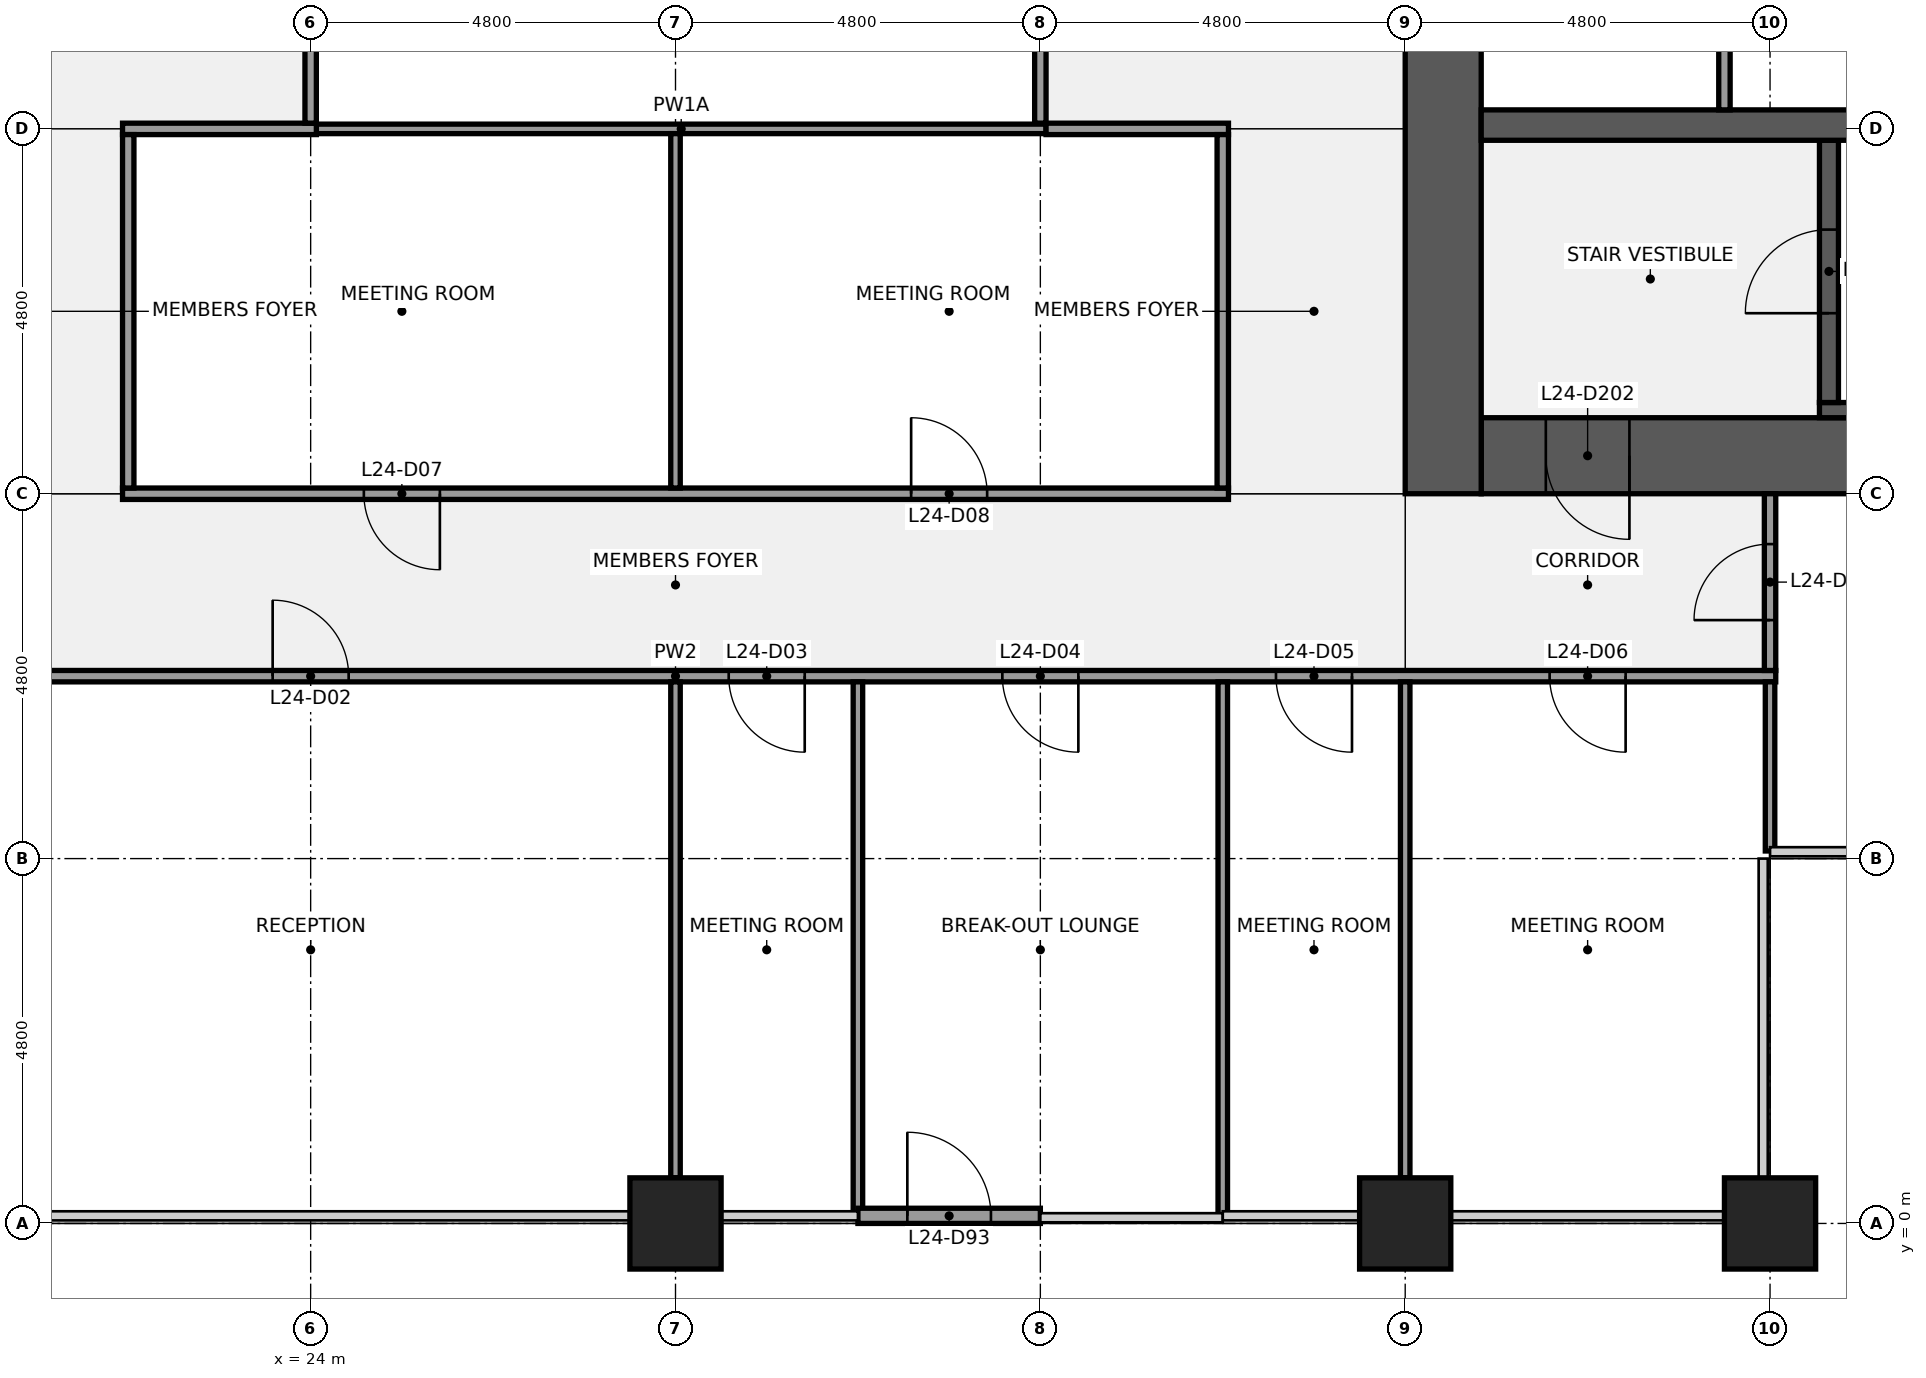
"""IFC4 building model, lengths in metres.
Left out: names, types, materials, properties, quantities, classifications, styles, units other than length and angle.
Written with IfcOpenShell. Run it as: python <this file> out.ifc"""

import sys

from ifc_helpers import new_model, si_unit, direction, frame, frame_2d, origin, origin_2d, place, context, subcontext, project, spatial, rectangle, extrude, element, fill, save


model = new_model("IFC4")
c1 = context("Model", 3, precision=1e-05, world=origin(), true_north=direction((0.0, 1.0)))
c2 = subcontext(c1, "Body", "Model", "MODEL_VIEW")
j1 = project(units=[si_unit("LENGTHUNIT", "METRE"), si_unit("PLANEANGLEUNIT", "RADIAN")], contexts=[c1])
p1 = place(None, origin())
s1 = spatial("IfcSite", under=j1, at=p1, CompositionType="ELEMENT")
p2 = place(p1, origin())
s2 = spatial("IfcBuilding", under=s1, at=p2, CompositionType="ELEMENT")
p3 = place(p2, frame((0.0, 0.0, 116.1)))
s3 = spatial("IfcBuildingStorey", under=s2, at=p3, CompositionType="ELEMENT", Elevation=116.1)
for number, where, z_axis, x_axis in (
    (1, (28.8, 0.0, 0.0), (0.0, 0.0, 1.0), (1.0, 0.0, 0.0)),
    (2, (38.4, 0.0, 0.0), (0.0, 0.0, 1.0), (1.0, 0.0, 0.0)),
    (3, (43.2, 0.0, 0.0), (0.0, 0.0, 1.0), (1.0, 0.0, 0.0)),
):
    element("IfcColumn", number, at=place(p3, frame(where, z_axis=z_axis, x_axis=x_axis)), inside=s3, PredefinedType="COLUMN", context=c2, shape_type="SweptSolid", body=[
        extrude(rectangle(XDim=1.2, YDim=1.2, at=origin_2d()), origin(), (0.0, 0.0, 1.0), 4.0),
    ])
p4 = place(p3, frame((52.8, 10.1, 0.0), z_axis=(0.0, 0.0, 1.0), x_axis=(-1.0, 0.0, 0.0)))
e4 = element("IfcWall", 4, at=p4, inside=s3, PredefinedType="SHEAR", context=c2, shape_type="SweptSolid", body=[
    extrude(rectangle(XDim=13.4, YDim=1.0, at=frame_2d((6.7, 0.0))), origin(), (0.0, 0.0, 1.0), 3.84),
])
p5 = place(p4, frame((11.45, 0.0, 0.0)))
e5 = element("IfcOpeningElement", 5, at=p5, cuts=e4, PredefinedType="OPENING", context=c2, shape_type="SweptSolid", body=[
    extrude(rectangle(XDim=1.1, YDim=2.1, at=frame_2d((0.55, 1.05))), frame((0.0, 0.51, 0.0), z_axis=(0.0, -1.0, 0.0), x_axis=(1.0, 0.0, 0.0)), (0.0, 0.0, 1.0), 1.02),
])
p6 = place(p3, frame((38.9, 9.6, 0.0), z_axis=(0.0, 0.0, 1.0), x_axis=(0.0, 1.0, 0.0)))
e6 = element("IfcWall", 6, at=p6, inside=s3, PredefinedType="SHEAR", context=c2, shape_type="SweptSolid", body=[
    extrude(rectangle(XDim=28.8, YDim=1.0, at=frame_2d((14.4, 0.0))), origin(), (0.0, 0.0, 1.0), 3.84),
])
p7 = place(p6, frame((8.7, 0.0, 0.0)))
e7 = element("IfcOpeningElement", 7, at=p7, cuts=e6, PredefinedType="OPENING", context=c2, shape_type="SweptSolid", body=[
    extrude(rectangle(XDim=1.8, YDim=2.1, at=frame_2d((0.9, 1.05))), frame((0.0, 0.51, 0.0), z_axis=(0.0, -1.0, 0.0), x_axis=(1.0, 0.0, 0.0)), (0.0, 0.0, 1.0), 1.02),
])
p8 = place(p6, frame((18.3, 0.0, 0.0)))
e8 = element("IfcOpeningElement", 8, at=p8, cuts=e6, PredefinedType="OPENING", context=c2, shape_type="SweptSolid", body=[
    extrude(rectangle(XDim=1.8, YDim=2.1, at=frame_2d((0.9, 1.05))), frame((0.0, 0.51, 0.0), z_axis=(0.0, -1.0, 0.0), x_axis=(1.0, 0.0, 0.0)), (0.0, 0.0, 1.0), 1.02),
])
p9 = place(p3, frame((43.85, 10.7, 0.0), z_axis=(0.0, 0.0, 1.0), x_axis=(1.0, 0.0, 0.0)))
e9 = element("IfcWall", 9, at=p9, inside=s3, PredefinedType="SHEAR", context=c2, shape_type="SweptSolid", body=[
    extrude(rectangle(XDim=7.5, YDim=0.2, at=frame_2d((3.75, 0.0))), origin(), (0.0, 0.0, 1.0), 3.84),
])
p10 = place(p3, frame((43.975, 10.8, 0.0), z_axis=(0.0, 0.0, 1.0), x_axis=(0.0, 1.0, 0.0)))
e10 = element("IfcWall", 10, at=p10, inside=s3, PredefinedType="SHEAR", context=c2, shape_type="SweptSolid", body=[
    extrude(rectangle(XDim=3.45, YDim=0.25, at=frame_2d((1.725, 0.0))), origin(), (0.0, 0.0, 1.0), 3.84),
])
p11 = place(p10, frame((1.175, 0.0, 0.0)))
e11 = element("IfcOpeningElement", 11, at=p11, cuts=e10, PredefinedType="OPENING", context=c2, shape_type="SweptSolid", body=[
    extrude(rectangle(XDim=1.1, YDim=2.1, at=frame_2d((0.55, 1.05))), frame((0.0, 0.135, 0.0), z_axis=(0.0, -1.0, 0.0), x_axis=(1.0, 0.0, 0.0)), (0.0, 0.0, 1.0), 0.27),
])
p12 = place(p3, frame((39.4, 14.45, 0.0), z_axis=(0.0, 0.0, 1.0), x_axis=(1.0, 0.0, 0.0)))
e12 = element("IfcWall", 12, at=p12, inside=s3, PredefinedType="SHEAR", context=c2, shape_type="SweptSolid", body=[
    extrude(rectangle(XDim=17.2, YDim=0.4, at=frame_2d((8.6, 0.0))), origin(), (0.0, 0.0, 1.0), 3.84),
])
p13 = place(p3, frame((42.6, 14.65, 0.0), z_axis=(0.0, 0.0, 1.0), x_axis=(0.0, 1.0, 0.0)))
e13 = element("IfcWall", 13, at=p13, inside=s3, PredefinedType="PARTITIONING", context=c2, shape_type="SweptSolid", body=[
    extrude(rectangle(XDim=2.6, YDim=0.15, at=frame_2d((1.3, 0.0))), origin(), (0.0, 0.0, 1.0), 3.84),
])
p14 = place(p3, frame((14.325, 7.2, 0.0), z_axis=(0.0, 0.0, 1.0), x_axis=(1.0, 0.0, 0.0)))
e14 = element("IfcWall", 14, at=p14, inside=s3, PredefinedType="PARTITIONING", context=c2, shape_type="SweptSolid", body=[
    extrude(rectangle(XDim=28.95, YDim=0.15, at=frame_2d((14.475, 0.0))), origin(), (0.0, 0.0, 1.0), 2.936),
])
p15 = place(p14, frame((1.975, 0.0, 0.0)))
e15 = element("IfcOpeningElement", 15, at=p15, cuts=e14, PredefinedType="OPENING", context=c2, shape_type="SweptSolid", body=[
    extrude(rectangle(XDim=1.0, YDim=2.1, at=frame_2d((0.5, 1.05))), frame((0.0, 0.085, 0.0), z_axis=(0.0, -1.0, 0.0), x_axis=(1.0, 0.0, 0.0)), (0.0, 0.0, 1.0), 0.17),
])
p16 = place(p14, frame((9.175, 0.0, 0.0)))
e16 = element("IfcOpeningElement", 16, at=p16, cuts=e14, PredefinedType="OPENING", context=c2, shape_type="SweptSolid", body=[
    extrude(rectangle(XDim=1.0, YDim=2.1, at=frame_2d((0.5, 1.05))), frame((0.0, 0.085, 0.0), z_axis=(0.0, -1.0, 0.0), x_axis=(1.0, 0.0, 0.0)), (0.0, 0.0, 1.0), 0.17),
])
p17 = place(p14, frame((15.175, 0.0, 0.0)))
e17 = element("IfcOpeningElement", 17, at=p17, cuts=e14, PredefinedType="OPENING", context=c2, shape_type="SweptSolid", body=[
    extrude(rectangle(XDim=1.0, YDim=2.1, at=frame_2d((0.5, 1.05))), frame((0.0, 0.085, 0.0), z_axis=(0.0, -1.0, 0.0), x_axis=(1.0, 0.0, 0.0)), (0.0, 0.0, 1.0), 0.17),
])
p18 = place(p14, frame((18.775, 0.0, 0.0)))
e18 = element("IfcOpeningElement", 18, at=p18, cuts=e14, PredefinedType="OPENING", context=c2, shape_type="SweptSolid", body=[
    extrude(rectangle(XDim=1.0, YDim=2.1, at=frame_2d((0.5, 1.05))), frame((0.0, 0.085, 0.0), z_axis=(0.0, -1.0, 0.0), x_axis=(1.0, 0.0, 0.0)), (0.0, 0.0, 1.0), 0.17),
])
p19 = place(p14, frame((22.375, 0.0, 0.0)))
e19 = element("IfcOpeningElement", 19, at=p19, cuts=e14, PredefinedType="OPENING", context=c2, shape_type="SweptSolid", body=[
    extrude(rectangle(XDim=1.0, YDim=2.1, at=frame_2d((0.5, 1.05))), frame((0.0, 0.085, 0.0), z_axis=(0.0, -1.0, 0.0), x_axis=(1.0, 0.0, 0.0)), (0.0, 0.0, 1.0), 0.17),
])
p20 = place(p14, frame((25.975, 0.0, 0.0)))
e20 = element("IfcOpeningElement", 20, at=p20, cuts=e14, PredefinedType="OPENING", context=c2, shape_type="SweptSolid", body=[
    extrude(rectangle(XDim=1.0, YDim=2.1, at=frame_2d((0.5, 1.05))), frame((0.0, 0.085, 0.0), z_axis=(0.0, -1.0, 0.0), x_axis=(1.0, 0.0, 0.0)), (0.0, 0.0, 1.0), 0.17),
])
p21 = place(p3, frame((21.525, 9.6, 0.0), z_axis=(0.0, 0.0, 1.0), x_axis=(1.0, 0.0, 0.0)))
e21 = element("IfcWall", 21, at=p21, inside=s3, PredefinedType="PARTITIONING", context=c2, shape_type="SweptSolid", body=[
    extrude(rectangle(XDim=14.55, YDim=0.15, at=frame_2d((7.275, 0.0))), origin(), (0.0, 0.0, 1.0), 2.936),
])
p22 = place(p21, frame((3.175, 0.0, 0.0)))
e22 = element("IfcOpeningElement", 22, at=p22, cuts=e21, PredefinedType="OPENING", context=c2, shape_type="SweptSolid", body=[
    extrude(rectangle(XDim=1.0, YDim=2.1, at=frame_2d((0.5, 1.05))), frame((0.0, 0.085, 0.0), z_axis=(0.0, -1.0, 0.0), x_axis=(1.0, 0.0, 0.0)), (0.0, 0.0, 1.0), 0.17),
])
p23 = place(p21, frame((10.375, 0.0, 0.0)))
e23 = element("IfcOpeningElement", 23, at=p23, cuts=e21, PredefinedType="OPENING", context=c2, shape_type="SweptSolid", body=[
    extrude(rectangle(XDim=1.0, YDim=2.1, at=frame_2d((0.5, 1.05))), frame((0.0, 0.085, 0.0), z_axis=(0.0, -1.0, 0.0), x_axis=(1.0, 0.0, 0.0)), (0.0, 0.0, 1.0), 0.17),
])
p24 = place(p3, frame((24.075, 14.4, 0.0), z_axis=(0.0, 0.0, 1.0), x_axis=(1.0, 0.0, 0.0)))
e24 = element("IfcWall", 24, at=p24, inside=s3, PredefinedType="PARTITIONING", context=c2, shape_type="SweptSolid", body=[
    extrude(rectangle(XDim=9.6, YDim=0.125, at=frame_2d((4.8, 0.0))), origin(), (0.0, 0.0, 1.0), 2.936),
])
p25 = place(p3, frame((21.525, 14.4, 0.0), z_axis=(0.0, 0.0, 1.0), x_axis=(1.0, 0.0, 0.0)))
e25 = element("IfcWall", 25, at=p25, inside=s3, PredefinedType="PARTITIONING", context=c2, shape_type="SweptSolid", body=[
    extrude(rectangle(XDim=2.55, YDim=0.15, at=frame_2d((1.275, 0.0))), origin(), (0.0, 0.0, 1.0), 2.936),
])
p26 = place(p3, frame((33.675, 14.4, 0.0), z_axis=(0.0, 0.0, 1.0), x_axis=(1.0, 0.0, 0.0)))
e26 = element("IfcWall", 26, at=p26, inside=s3, PredefinedType="PARTITIONING", context=c2, shape_type="SweptSolid", body=[
    extrude(rectangle(XDim=2.4, YDim=0.15, at=frame_2d((1.2, 0.0))), origin(), (0.0, 0.0, 1.0), 2.936),
])
p27 = place(p3, frame((21.6, 9.675, 0.0), z_axis=(0.0, 0.0, 1.0), x_axis=(0.0, 1.0, 0.0)))
e27 = element("IfcWall", 27, at=p27, inside=s3, PredefinedType="PARTITIONING", context=c2, shape_type="SweptSolid", body=[
    extrude(rectangle(XDim=4.65, YDim=0.15, at=frame_2d((2.325, 0.0))), origin(), (0.0, 0.0, 1.0), 2.936),
])
p28 = place(p3, frame((24.0, 14.475, 0.0), z_axis=(0.0, 0.0, 1.0), x_axis=(0.0, 1.0, 0.0)))
e28 = element("IfcWall", 28, at=p28, inside=s3, PredefinedType="PARTITIONING", context=c2, shape_type="SweptSolid", body=[
    extrude(rectangle(XDim=3.45, YDim=0.15, at=frame_2d((1.725, 0.0))), origin(), (0.0, 0.0, 1.0), 2.936),
])
p29 = place(p3, frame((28.8, 0.6, 0.0), z_axis=(0.0, 0.0, 1.0), x_axis=(0.0, 1.0, 0.0)))
e29 = element("IfcWall", 29, at=p29, inside=s3, PredefinedType="PARTITIONING", context=c2, shape_type="SweptSolid", body=[
    extrude(rectangle(XDim=6.525, YDim=0.125, at=frame_2d((3.262, 0.0))), origin(), (0.0, 0.0, 1.0), 2.936),
])
p30 = place(p3, frame((28.8, 9.675, 0.0), z_axis=(0.0, 0.0, 1.0), x_axis=(0.0, 1.0, 0.0)))
e30 = element("IfcWall", 30, at=p30, inside=s3, PredefinedType="PARTITIONING", context=c2, shape_type="SweptSolid", body=[
    extrude(rectangle(XDim=4.662, YDim=0.125, at=frame_2d((2.331, 0.0))), origin(), (0.0, 0.0, 1.0), 2.936),
])
p31 = place(p3, frame((31.2, 0.1, 0.0), z_axis=(0.0, 0.0, 1.0), x_axis=(0.0, 1.0, 0.0)))
e31 = element("IfcWall", 31, at=p31, inside=s3, PredefinedType="PARTITIONING", context=c2, shape_type="SweptSolid", body=[
    extrude(rectangle(XDim=7.025, YDim=0.125, at=frame_2d((3.512, 0.0))), origin(), (0.0, 0.0, 1.0), 2.936),
])
p32 = place(p3, frame((33.6, 14.475, 0.0), z_axis=(0.0, 0.0, 1.0), x_axis=(0.0, 1.0, 0.0)))
e32 = element("IfcWall", 32, at=p32, inside=s3, PredefinedType="PARTITIONING", context=c2, shape_type="SweptSolid", body=[
    extrude(rectangle(XDim=3.45, YDim=0.15, at=frame_2d((1.725, 0.0))), origin(), (0.0, 0.0, 1.0), 2.936),
])
p33 = place(p3, frame((36.0, 0.1, 0.0), z_axis=(0.0, 0.0, 1.0), x_axis=(0.0, 1.0, 0.0)))
e33 = element("IfcWall", 33, at=p33, inside=s3, PredefinedType="PARTITIONING", context=c2, shape_type="SweptSolid", body=[
    extrude(rectangle(XDim=7.025, YDim=0.125, at=frame_2d((3.512, 0.0))), origin(), (0.0, 0.0, 1.0), 2.936),
])
p34 = place(p3, frame((36.0, 9.675, 0.0), z_axis=(0.0, 0.0, 1.0), x_axis=(0.0, 1.0, 0.0)))
e34 = element("IfcWall", 34, at=p34, inside=s3, PredefinedType="PARTITIONING", context=c2, shape_type="SweptSolid", body=[
    extrude(rectangle(XDim=4.65, YDim=0.15, at=frame_2d((2.325, 0.0))), origin(), (0.0, 0.0, 1.0), 2.936),
])
p35 = place(p3, frame((38.4, 0.6, 0.0), z_axis=(0.0, 0.0, 1.0), x_axis=(0.0, 1.0, 0.0)))
e35 = element("IfcWall", 35, at=p35, inside=s3, PredefinedType="PARTITIONING", context=c2, shape_type="SweptSolid", body=[
    extrude(rectangle(XDim=6.525, YDim=0.125, at=frame_2d((3.262, 0.0))), origin(), (0.0, 0.0, 1.0), 2.936),
])
p36 = place(p3, frame((43.2, 4.9, 0.0), z_axis=(0.0, 0.0, 1.0), x_axis=(0.0, 1.0, 0.0)))
e36 = element("IfcWall", 36, at=p36, inside=s3, PredefinedType="PARTITIONING", context=c2, shape_type="SweptSolid", body=[
    extrude(rectangle(XDim=2.225, YDim=0.125, at=frame_2d((1.113, 0.0))), origin(), (0.0, 0.0, 1.0), 2.936),
])
p37 = place(p3, frame((43.2, 7.275, 0.0), z_axis=(0.0, 0.0, 1.0), x_axis=(0.0, 1.0, 0.0)))
e37 = element("IfcWall", 37, at=p37, inside=s3, PredefinedType="PARTITIONING", context=c2, shape_type="SweptSolid", body=[
    extrude(rectangle(XDim=2.325, YDim=0.15, at=frame_2d((1.163, 0.0))), origin(), (0.0, 0.0, 1.0), 2.936),
])
p38 = place(p37, frame((0.663, 0.0, 0.0)))
e38 = element("IfcOpeningElement", 38, at=p38, cuts=e37, PredefinedType="OPENING", context=c2, shape_type="SweptSolid", body=[
    extrude(rectangle(XDim=1.0, YDim=2.1, at=frame_2d((0.5, 1.05))), frame((0.0, 0.085, 0.0), z_axis=(0.0, -1.0, 0.0), x_axis=(1.0, 0.0, 0.0)), (0.0, 0.0, 1.0), 0.17),
])
p39 = place(p3, frame((31.2, 0.1, 0.0), z_axis=(0.0, 0.0, 1.0), x_axis=(1.0, 0.0, 0.0)))
e39 = element("IfcWall", 39, at=p39, inside=s3, PredefinedType="SOLIDWALL", context=c2, shape_type="SweptSolid", body=[
    extrude(rectangle(XDim=2.4, YDim=0.2, at=frame_2d((1.2, 0.0))), origin(), (0.0, 0.0, 1.0), 3.314),
])
p40 = place(p39, frame((0.65, 0.0, 0.0)))
e40 = element("IfcOpeningElement", 40, at=p40, cuts=e39, PredefinedType="OPENING", context=c2, shape_type="SweptSolid", body=[
    extrude(rectangle(XDim=1.1, YDim=2.1, at=frame_2d((0.55, 1.05))), frame((0.0, 0.11, 0.0), z_axis=(0.0, -1.0, 0.0), x_axis=(1.0, 0.0, 0.0)), (0.0, 0.0, 1.0), 0.22),
])
for number, where, z_axis, x_axis in (
    (41, (19.2, -1.05, 0.0), (0.0, 0.0, 1.0), (1.0, 0.0, 0.0)),
    (42, (38.4, -1.05, 0.0), (0.0, 0.0, 1.0), (1.0, 0.0, 0.0)),
    (43, (43.2, -1.05, 0.0), (0.0, 0.0, 1.0), (1.0, 0.0, 0.0)),
):
    element("IfcColumn", number, at=place(p3, frame(where, z_axis=z_axis, x_axis=x_axis)), inside=s3, PredefinedType="PILASTER", context=c2, shape_type="SweptSolid", body=[
        extrude(rectangle(XDim=3.6, YDim=0.9, at=origin_2d()), origin(), (0.0, 0.0, 1.0), 4.0),
    ])
p41 = place(p11, origin())
e44 = element("IfcDoor", 44, at=p41, inside=s3, OperationType="SINGLE_SWING_LEFT", PredefinedType="DOOR", context=c2, shape_type="SweptSolid", body=[
    extrude(rectangle(XDim=1.1, YDim=2.1, at=frame_2d((0.55, 1.05))), frame((0.0, 0.025, 0.0), z_axis=(0.0, -1.0, 0.0), x_axis=(1.0, 0.0, 0.0)), (0.0, 0.0, 1.0), 0.05),
])
fill(e11, e44)
p42 = place(p5, origin())
e45 = element("IfcDoor", 45, at=p42, inside=s3, OperationType="SINGLE_SWING_LEFT", PredefinedType="DOOR", context=c2, shape_type="SweptSolid", body=[
    extrude(rectangle(XDim=1.1, YDim=2.1, at=frame_2d((0.55, 1.05))), frame((0.0, 0.025, 0.0), z_axis=(0.0, -1.0, 0.0), x_axis=(1.0, 0.0, 0.0)), (0.0, 0.0, 1.0), 0.05),
])
fill(e5, e45)
p43 = place(p16, origin())
e46 = element("IfcDoor", 46, at=p43, inside=s3, OperationType="SINGLE_SWING_LEFT", PredefinedType="DOOR", context=c2, shape_type="SweptSolid", body=[
    extrude(rectangle(XDim=1.0, YDim=2.1, at=frame_2d((0.5, 1.05))), frame((0.0, 0.025, 0.0), z_axis=(0.0, -1.0, 0.0), x_axis=(1.0, 0.0, 0.0)), (0.0, 0.0, 1.0), 0.05),
])
fill(e16, e46)
p44 = place(p17, origin())
e47 = element("IfcDoor", 47, at=p44, inside=s3, OperationType="SINGLE_SWING_RIGHT", PredefinedType="DOOR", context=c2, shape_type="SweptSolid", body=[
    extrude(rectangle(XDim=1.0, YDim=2.1, at=frame_2d((0.5, 1.05))), frame((0.0, 0.025, 0.0), z_axis=(0.0, -1.0, 0.0), x_axis=(1.0, 0.0, 0.0)), (0.0, 0.0, 1.0), 0.05),
])
fill(e17, e47)
p45 = place(p18, origin())
e48 = element("IfcDoor", 48, at=p45, inside=s3, OperationType="SINGLE_SWING_RIGHT", PredefinedType="DOOR", context=c2, shape_type="SweptSolid", body=[
    extrude(rectangle(XDim=1.0, YDim=2.1, at=frame_2d((0.5, 1.05))), frame((0.0, 0.025, 0.0), z_axis=(0.0, -1.0, 0.0), x_axis=(1.0, 0.0, 0.0)), (0.0, 0.0, 1.0), 0.05),
])
fill(e18, e48)
p46 = place(p19, origin())
e49 = element("IfcDoor", 49, at=p46, inside=s3, OperationType="SINGLE_SWING_RIGHT", PredefinedType="DOOR", context=c2, shape_type="SweptSolid", body=[
    extrude(rectangle(XDim=1.0, YDim=2.1, at=frame_2d((0.5, 1.05))), frame((0.0, 0.025, 0.0), z_axis=(0.0, -1.0, 0.0), x_axis=(1.0, 0.0, 0.0)), (0.0, 0.0, 1.0), 0.05),
])
fill(e19, e49)
p47 = place(p20, origin())
e50 = element("IfcDoor", 50, at=p47, inside=s3, OperationType="SINGLE_SWING_RIGHT", PredefinedType="DOOR", context=c2, shape_type="SweptSolid", body=[
    extrude(rectangle(XDim=1.0, YDim=2.1, at=frame_2d((0.5, 1.05))), frame((0.0, 0.025, 0.0), z_axis=(0.0, -1.0, 0.0), x_axis=(1.0, 0.0, 0.0)), (0.0, 0.0, 1.0), 0.05),
])
fill(e20, e50)
p48 = place(p22, origin())
e51 = element("IfcDoor", 51, at=p48, inside=s3, OperationType="SINGLE_SWING_RIGHT", PredefinedType="DOOR", context=c2, shape_type="SweptSolid", body=[
    extrude(rectangle(XDim=1.0, YDim=2.1, at=frame_2d((0.5, 1.05))), frame((0.0, 0.025, 0.0), z_axis=(0.0, -1.0, 0.0), x_axis=(1.0, 0.0, 0.0)), (0.0, 0.0, 1.0), 0.05),
])
fill(e22, e51)
p49 = place(p23, origin())
e52 = element("IfcDoor", 52, at=p49, inside=s3, OperationType="SINGLE_SWING_LEFT", PredefinedType="DOOR", context=c2, shape_type="SweptSolid", body=[
    extrude(rectangle(XDim=1.0, YDim=2.1, at=frame_2d((0.5, 1.05))), frame((0.0, 0.025, 0.0), z_axis=(0.0, -1.0, 0.0), x_axis=(1.0, 0.0, 0.0)), (0.0, 0.0, 1.0), 0.05),
])
fill(e23, e52)
p50 = place(p38, origin())
e53 = element("IfcDoor", 53, at=p50, inside=s3, OperationType="SINGLE_SWING_LEFT", PredefinedType="DOOR", context=c2, shape_type="SweptSolid", body=[
    extrude(rectangle(XDim=1.0, YDim=2.1, at=frame_2d((0.5, 1.05))), frame((0.0, 0.025, 0.0), z_axis=(0.0, -1.0, 0.0), x_axis=(1.0, 0.0, 0.0)), (0.0, 0.0, 1.0), 0.05),
])
fill(e38, e53)
p51 = place(p40, origin())
e54 = element("IfcDoor", 54, at=p51, inside=s3, OperationType="SINGLE_SWING_LEFT", PredefinedType="DOOR", context=c2, shape_type="SweptSolid", body=[
    extrude(rectangle(XDim=1.1, YDim=2.1, at=frame_2d((0.55, 1.05))), frame((0.0, 0.025, 0.0), z_axis=(0.0, -1.0, 0.0), x_axis=(1.0, 0.0, 0.0)), (0.0, 0.0, 1.0), 0.05),
])
fill(e40, e54)
save(model, sys.argv[1])
